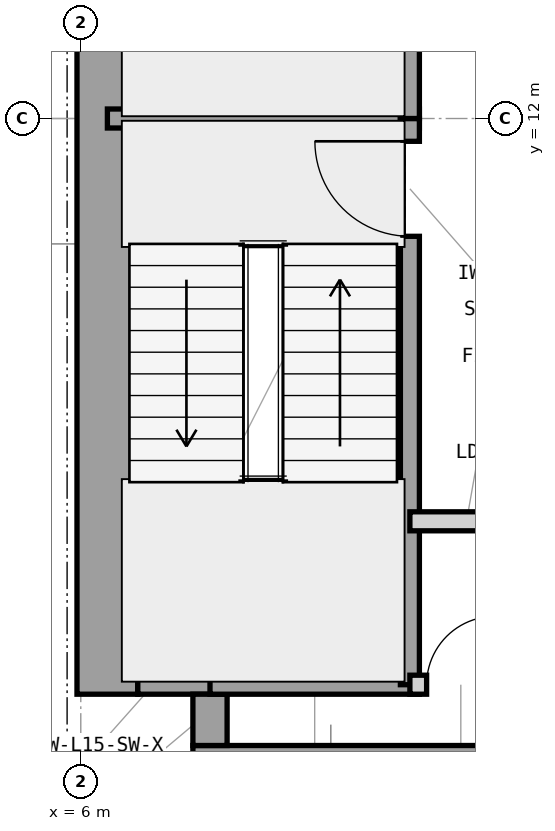
"""IFC4 building model, lengths in metres.
Left out: names, types, materials, properties, quantities, classifications, styles, units other than length and angle.
Written with IfcOpenShell. Run it as: python <this file> out.ifc"""

import sys

from ifc_helpers import new_model, si_unit, direction, frame, frame_2d, origin, place, context, subcontext, project, spatial, rectangle, extrude, element, fill, save


model = new_model("IFC4")
c1 = context("Model", 3, precision=1e-05, world=origin(), true_north=direction((0.0, 1.0)))
c2 = subcontext(c1, "Body", "Model", "MODEL_VIEW")
j1 = project(units=[si_unit("LENGTHUNIT", "METRE"), si_unit("PLANEANGLEUNIT", "RADIAN")], contexts=[c1])
p1 = place(None, origin())
s1 = spatial("IfcSite", under=j1, at=p1, CompositionType="ELEMENT")
p2 = place(p1, origin())
s2 = spatial("IfcBuilding", under=s1, at=p2, CompositionType="ELEMENT")
p3 = place(p2, frame((0.0, 0.0, 67.8)))
s3 = spatial("IfcBuildingStorey", under=s2, at=p3, CompositionType="ELEMENT", Elevation=67.8)
p4 = place(p3, frame((7.475, 3.35, 0.0), z_axis=(0.0, 0.0, 1.0), x_axis=(1.0, 0.0, 0.0)))
e1 = element("IfcWall", 1, at=p4, inside=s3, PredefinedType="SHEAR", context=c2, shape_type="SweptSolid", body=[
    extrude(rectangle(XDim=16.575, YDim=0.8, at=frame_2d((8.288, 0.0))), origin(), (0.0, 0.0, 1.0), 4.2),
])
p5 = place(p3, frame((6.35, 4.425, 0.0), z_axis=(0.0, 0.0, 1.0), x_axis=(0.0, 1.0, 0.0)))
e2 = element("IfcWall", 2, at=p5, inside=s3, PredefinedType="SHEAR", context=c2, shape_type="SweptSolid", body=[
    extrude(rectangle(XDim=15.15, YDim=0.8, at=frame_2d((7.575, 0.0))), origin(), (0.0, 0.0, 1.0), 4.2),
])
p6 = place(p3, frame((6.75, 4.65, 0.0), z_axis=(0.0, 0.0, 1.0), x_axis=(1.0, 0.0, 0.0)))
e3 = element("IfcWall", 3, at=p6, inside=s3, PredefinedType="SHEAR", context=c2, shape_type="SweptSolid", body=[
    extrude(rectangle(XDim=1.175, YDim=0.45, at=frame_2d((0.587, 0.0))), origin(), (0.0, 0.0, 1.0), 4.2),
])
p7 = place(p3, frame((7.7, 3.75, 0.0), z_axis=(0.0, 0.0, 1.0), x_axis=(0.0, 1.0, 0.0)))
e4 = element("IfcWall", 4, at=p7, inside=s3, PredefinedType="SHEAR", context=c2, shape_type="SweptSolid", body=[
    extrude(rectangle(XDim=0.675, YDim=0.45, at=frame_2d((0.337, 0.0))), origin(), (0.0, 0.0, 1.0), 4.2),
])
p8 = place(p3, frame((6.35, 12.0, 0.0), z_axis=(0.0, 0.0, 1.0), x_axis=(1.0, 0.0, 0.0)))
e5 = element("IfcWall", 5, at=p8, inside=s3, PredefinedType="SHEAR", context=c2, shape_type="SweptSolid", body=[
    extrude(rectangle(XDim=4.105, YDim=0.25, at=frame_2d((2.052, 0.0))), origin(), (0.0, 0.0, 1.0), 4.2),
])
p9 = place(p3, frame((7.7, 4.55, 0.0), z_axis=(0.0, 0.0, 1.0), x_axis=(1.0, 0.0, 0.0)))
e6 = element("IfcWall", 6, at=p9, inside=s3, PredefinedType="SHEAR", context=c2, shape_type="SweptSolid", body=[
    extrude(rectangle(XDim=2.755, YDim=0.25, at=frame_2d((1.377, 0.0))), origin(), (0.0, 0.0, 1.0), 4.2),
])
p10 = place(p3, frame((10.33, 4.55, 0.0), z_axis=(0.0, 0.0, 1.0), x_axis=(0.0, 1.0, 0.0)))
e7 = element("IfcWall", 7, at=p10, inside=s3, PredefinedType="SHEAR", context=c2, shape_type="SweptSolid", body=[
    extrude(rectangle(XDim=7.45, YDim=0.25, at=frame_2d((3.725, 0.0))), origin(), (0.0, 0.0, 1.0), 4.2),
])
p11 = place(p10, frame((5.9, 0.0, 0.0)))
e8 = element("IfcOpeningElement", 8, at=p11, cuts=e7, PredefinedType="OPENING", context=c2, shape_type="SweptSolid", body=[
    extrude(rectangle(XDim=1.25, YDim=2.2, at=frame_2d((0.625, 1.1))), frame((0.0, 0.135, 0.0), z_axis=(0.0, -1.0, 0.0), x_axis=(1.0, 0.0, 0.0)), (0.0, 0.0, 1.0), 0.27),
])
p12 = place(p3, frame((10.33, 12.0, 0.0), z_axis=(0.0, 0.0, 1.0), x_axis=(0.0, 1.0, 0.0)))
e9 = element("IfcWall", 9, at=p12, inside=s3, PredefinedType="SHEAR", context=c2, shape_type="SweptSolid", body=[
    extrude(rectangle(XDim=7.45, YDim=0.25, at=frame_2d((3.725, 0.0))), origin(), (0.0, 0.0, 1.0), 4.2),
])
p13 = place(p12, frame((5.85, 0.0, 0.0)))
e10 = element("IfcOpeningElement", 10, at=p13, cuts=e9, PredefinedType="OPENING", context=c2, shape_type="SweptSolid", body=[
    extrude(rectangle(XDim=1.25, YDim=2.2, at=frame_2d((0.625, 1.1))), frame((0.0, 0.135, 0.0), z_axis=(0.0, -1.0, 0.0), x_axis=(1.0, 0.0, 0.0)), (0.0, 0.0, 1.0), 0.27),
])
p14 = place(p3, frame((10.33, 4.55, 0.0), z_axis=(0.0, 0.0, 1.0), x_axis=(1.0, 0.0, 0.0)))
e11 = element("IfcWall", 11, at=p14, inside=s3, PredefinedType="PARTITIONING", context=c2, shape_type="SweptSolid", body=[
    extrude(rectangle(XDim=1.49, YDim=0.25, at=frame_2d((0.745, 0.0))), origin(), (0.0, 0.0, 1.0), 3.97),
])
p15 = place(p14, frame((0.22, 0.0, 0.0)))
e12 = element("IfcOpeningElement", 12, at=p15, cuts=e11, PredefinedType="OPENING", context=c2, shape_type="SweptSolid", body=[
    extrude(rectangle(XDim=0.9, YDim=2.1, at=frame_2d((0.45, 1.05))), frame((0.0, 0.135, 0.0), z_axis=(0.0, -1.0, 0.0), x_axis=(1.0, 0.0, 0.0)), (0.0, 0.0, 1.0), 0.27),
])
p16 = place(p3, frame((10.33, 6.7, 0.0), z_axis=(0.0, 0.0, 1.0), x_axis=(1.0, 0.0, 0.0)))
e13 = element("IfcWall", 13, at=p16, inside=s3, PredefinedType="PARTITIONING", context=c2, shape_type="SweptSolid", body=[
    extrude(rectangle(XDim=1.49, YDim=0.25, at=frame_2d((0.745, 0.0))), origin(), (0.0, 0.0, 1.0), 3.426),
])
p17 = place(p11, origin())
e14 = element("IfcDoor", 14, at=p17, inside=s3, OperationType="SINGLE_SWING_RIGHT", PredefinedType="DOOR", context=c2, shape_type="SweptSolid", body=[
    extrude(rectangle(XDim=1.25, YDim=2.2, at=frame_2d((0.625, 1.1))), frame((0.0, 0.025, 0.0), z_axis=(0.0, -1.0, 0.0), x_axis=(1.0, 0.0, 0.0)), (0.0, 0.0, 1.0), 0.05),
])
fill(e8, e14)
p18 = place(p15, origin())
e15 = element("IfcDoor", 15, at=p18, inside=s3, OperationType="SINGLE_SWING_RIGHT", PredefinedType="TRAPDOOR", context=c2, shape_type="SweptSolid", body=[
    extrude(rectangle(XDim=0.9, YDim=2.1, at=frame_2d((0.45, 1.05))), frame((0.0, 0.025, 0.0), z_axis=(0.0, -1.0, 0.0), x_axis=(1.0, 0.0, 0.0)), (0.0, 0.0, 1.0), 0.05),
])
fill(e12, e15)
save(model, sys.argv[1])
